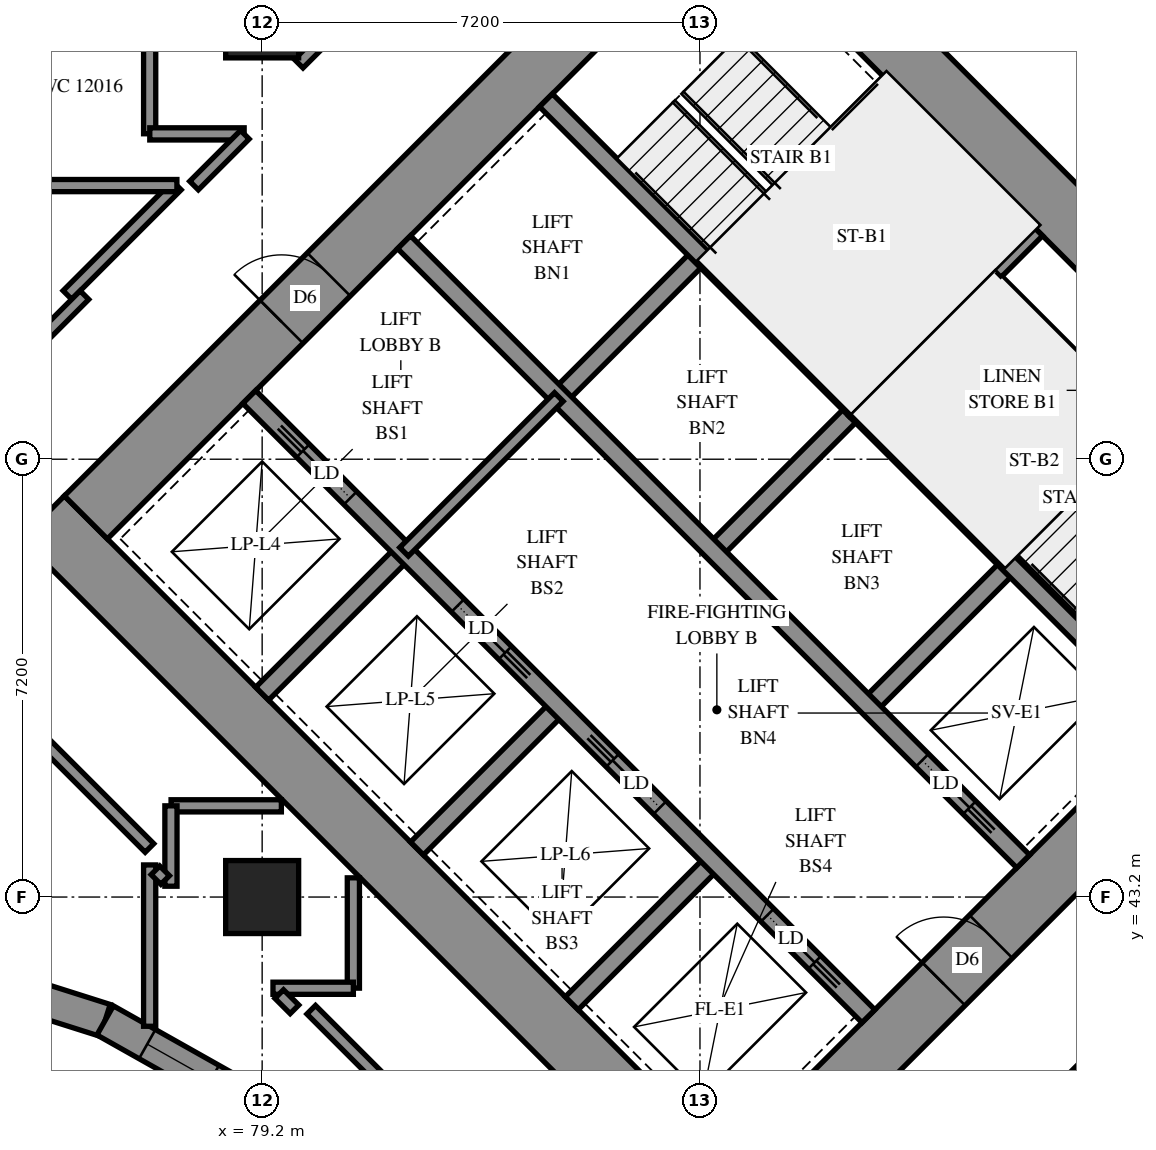
"""IFC4 building model, lengths in metres.
Left out: names, types, materials, properties, quantities, classifications, styles, units other than length and angle.
Written with IfcOpenShell. Run it as: python <this file> out.ifc"""

import sys

from ifc_helpers import new_model, si_unit, direction, frame, frame_2d, origin, origin_2d, place, context, subcontext, project, spatial, polyline, rectangle, outline, extrude, element, fill, save


model = new_model("IFC4")
c1 = context("Model", 3, precision=1e-05, world=origin(), true_north=direction((0.0, 1.0)))
c2 = subcontext(c1, "Body", "Model", "MODEL_VIEW")
j1 = project(units=[si_unit("LENGTHUNIT", "METRE"), si_unit("PLANEANGLEUNIT", "RADIAN")], contexts=[c1])
p1 = place(None, origin())
s1 = spatial("IfcSite", under=j1, at=p1, CompositionType="ELEMENT")
p2 = place(p1, origin())
s2 = spatial("IfcBuilding", under=s1, at=p2, CompositionType="ELEMENT")
p3 = place(p2, frame((0.0, 0.0, 47.4)))
s3 = spatial("IfcBuildingStorey", under=s2, at=p3, CompositionType="ELEMENT", Elevation=47.4)
for number, where, z_axis, x_axis in (
    (1, (79.2, 43.2, 0.0), (0.0, 0.0, 1.0), (1.0, 0.0, 0.0)),
    (2, (79.2, 57.6, 0.0), (0.0, 0.0, 1.0), (1.0, 0.0, 0.0)),
):
    element("IfcColumn", number, at=place(p3, frame(where, z_axis=z_axis, x_axis=x_axis)), inside=s3, PredefinedType="COLUMN", context=c2, shape_type="SweptSolid", body=[
        extrude(rectangle(XDim=1.2, YDim=1.2, at=origin_2d()), origin(), (0.0, 0.0, 1.0), 3.1),
    ])
p4 = place(p3, frame((75.594, 49.443, -0.3), z_axis=(0.0, 0.0, 1.0), x_axis=(0.7071037324, -0.70710983, 0.0)))
e3 = element("IfcWall", 3, at=p4, inside=s3, PredefinedType="SHEAR", context=c2, shape_type="SweptSolid", body=[
    extrude(rectangle(XDim=16.4, YDim=1.0, at=frame_2d((8.2, 0.0))), origin(), (0.0, 0.0, 1.0), 2.7),
])
p5 = place(p3, frame((86.483, 60.333, -0.3), z_axis=(0.0, 0.0, 1.0), x_axis=(0.70710983, -0.7071037324, 0.0)))
e4 = element("IfcWall", 4, at=p5, inside=s3, PredefinedType="SHEAR", context=c2, shape_type="SweptSolid", body=[
    extrude(rectangle(XDim=16.4, YDim=1.0, at=frame_2d((8.2, 0.0))), origin(), (0.0, 0.0, 1.0), 2.7),
])
p6 = place(p5, frame((11.0, 0.0, 0.3)))
e5 = element("IfcOpeningElement", 5, at=p6, cuts=e4, PredefinedType="OPENING", context=c2, shape_type="SweptSolid", body=[
    extrude(rectangle(XDim=0.8, YDim=2.1, at=frame_2d((0.4, 1.05))), frame((0.0, 0.51, 0.0), z_axis=(0.0, -1.0, 0.0), x_axis=(1.0, 0.0, 0.0)), (0.0, 0.0, 1.0), 1.02),
])
p7 = place(p3, frame((76.301, 49.443, -0.3), z_axis=(0.0, 0.0, 1.0), x_axis=(0.7071067812, 0.7071067812, 0.0)))
e6 = element("IfcWall", 6, at=p7, inside=s3, PredefinedType="SHEAR", context=c2, shape_type="SweptSolid", body=[
    extrude(rectangle(XDim=14.4, YDim=1.0, at=frame_2d((7.2, 0.0))), origin(), (0.0, 0.0, 1.0), 2.7),
])
p8 = place(p7, frame((4.55, 0.0, 0.3)))
e7 = element("IfcOpeningElement", 7, at=p8, cuts=e6, PredefinedType="OPENING", context=c2, shape_type="SweptSolid", body=[
    extrude(rectangle(XDim=1.1, YDim=2.1, at=frame_2d((0.55, 1.05))), frame((0.0, 0.51, 0.0), z_axis=(0.0, -1.0, 0.0), x_axis=(1.0, 0.0, 0.0)), (0.0, 0.0, 1.0), 1.02),
])
p9 = place(p7, frame((11.35, 0.0, 0.3)))
e8 = element("IfcOpeningElement", 8, at=p9, cuts=e6, PredefinedType="OPENING", context=c2, shape_type="SweptSolid", body=[
    extrude(rectangle(XDim=1.1, YDim=2.1, at=frame_2d((0.55, 1.05))), frame((0.0, 0.51, 0.0), z_axis=(0.0, -1.0, 0.0), x_axis=(1.0, 0.0, 0.0)), (0.0, 0.0, 1.0), 1.02),
])
p10 = place(p3, frame((87.19, 38.554, -0.3), z_axis=(0.0, 0.0, 1.0), x_axis=(0.707103309, 0.7071102534, 0.0)))
e9 = element("IfcWall", 9, at=p10, inside=s3, PredefinedType="SHEAR", context=c2, shape_type="SweptSolid", body=[
    extrude(rectangle(XDim=14.4, YDim=1.0, at=frame_2d((7.2, 0.0))), origin(), (0.0, 0.0, 1.0), 2.7),
])
p11 = place(p10, frame((4.55, 0.0, 0.3)))
e10 = element("IfcOpeningElement", 10, at=p11, cuts=e9, PredefinedType="OPENING", context=c2, shape_type="SweptSolid", body=[
    extrude(rectangle(XDim=1.1, YDim=2.1, at=frame_2d((0.55, 1.05))), frame((0.0, 0.51, 0.0), z_axis=(0.0, -1.0, 0.0), x_axis=(1.0, 0.0, 0.0)), (0.0, 0.0, 1.0), 1.02),
])
p12 = place(p10, frame((11.35, 0.0, 0.3)))
e11 = element("IfcOpeningElement", 11, at=p12, cuts=e9, PredefinedType="OPENING", context=c2, shape_type="SweptSolid", body=[
    extrude(rectangle(XDim=1.1, YDim=2.1, at=frame_2d((0.55, 1.05))), frame((0.0, 0.51, 0.0), z_axis=(0.0, -1.0, 0.0), x_axis=(1.0, 0.0, 0.0)), (0.0, 0.0, 1.0), 1.02),
])
for number, where, z_axis, x_axis in (
    (12, (79.2, 46.544, 0.0), (0.0, 0.0, 1.0), (0.707, 0.707, 0.0)),
    (13, (84.079, 51.423, 0.0), (0.0, 0.0, 1.0), (0.707, 0.707, 0.0)),
):
    element("IfcWall", number, at=place(p3, frame(where, z_axis=z_axis, x_axis=x_axis)), inside=s3, PredefinedType="SOLIDWALL", context=c2, shape_type="SweptSolid", body=[
        extrude(rectangle(XDim=3.3, YDim=0.3, at=frame_2d((1.65, 0.0))), origin(), (0.0, 0.0, 1.0), 3.1),
    ])
p13 = place(p3, frame((81.746, 43.999, 0.0), z_axis=(0.0, 0.0, 1.0), x_axis=(0.7071067812, 0.7071067812, 0.0)))
e14 = element("IfcWall", 14, at=p13, inside=s3, PredefinedType="SOLIDWALL", context=c2, shape_type="SweptSolid", body=[
    extrude(rectangle(XDim=3.3, YDim=0.3, at=frame_2d((1.65, 0.0))), origin(), (0.0, 0.0, 1.0), 3.1),
])
p14 = place(p3, frame((86.625, 48.878, 0.0), z_axis=(0.0, 0.0, 1.0), x_axis=(0.7071067812, 0.7071067812, 0.0)))
e15 = element("IfcWall", 15, at=p14, inside=s3, PredefinedType="SOLIDWALL", context=c2, shape_type="SweptSolid", body=[
    extrude(rectangle(XDim=3.3, YDim=0.3, at=frame_2d((1.65, 0.0))), origin(), (0.0, 0.0, 1.0), 3.1),
])
p15 = place(p3, frame((84.291, 41.453, 0.0), z_axis=(0.0, 0.0, 1.0), x_axis=(0.7071067812, 0.7071067812, 0.0)))
e16 = element("IfcWall", 16, at=p15, inside=s3, PredefinedType="SOLIDWALL", context=c2, shape_type="SweptSolid", body=[
    extrude(rectangle(XDim=3.3, YDim=0.3, at=frame_2d((1.65, 0.0))), origin(), (0.0, 0.0, 1.0), 3.1),
])
p16 = place(p3, frame((89.17, 46.332, 0.0), z_axis=(0.0, 0.0, 1.0), x_axis=(0.7071067812, 0.7071067812, 0.0)))
e17 = element("IfcWall", 17, at=p16, inside=s3, PredefinedType="SOLIDWALL", context=c2, shape_type="SweptSolid", body=[
    extrude(rectangle(XDim=3.3, YDim=0.3, at=frame_2d((1.65, 0.0))), origin(), (0.0, 0.0, 1.0), 3.1),
])
p17 = place(p3, frame((78.988, 51.423, 0.0), z_axis=(0.0, 0.0, 1.0), x_axis=(0.7071067812, -0.7071067812, 0.0)))
e18 = element("IfcWall", 18, at=p17, inside=s3, PredefinedType="SOLIDWALL", context=c2, shape_type="SweptSolid", body=[
    extrude(rectangle(XDim=14.4, YDim=0.3, at=frame_2d((7.2, 0.0))), origin(), (0.0, 0.0, 1.0), 3.1),
])
p18 = place(p17, frame((1.25, 0.0, 0.0)))
e19 = element("IfcOpeningElement", 19, at=p18, cuts=e18, PredefinedType="OPENING", context=c2, shape_type="SweptSolid", body=[
    extrude(rectangle(XDim=1.1, YDim=2.1, at=frame_2d((0.55, 1.05))), frame((0.0, 0.16, 0.0), z_axis=(0.0, -1.0, 0.0), x_axis=(1.0, 0.0, 0.0)), (0.0, 0.0, 1.0), 0.32),
])
p19 = place(p17, frame((4.85, 0.0, 0.0)))
e20 = element("IfcOpeningElement", 20, at=p19, cuts=e18, PredefinedType="OPENING", context=c2, shape_type="SweptSolid", body=[
    extrude(rectangle(XDim=1.1, YDim=2.1, at=frame_2d((0.55, 1.05))), frame((0.0, 0.16, 0.0), z_axis=(0.0, -1.0, 0.0), x_axis=(1.0, 0.0, 0.0)), (0.0, 0.0, 1.0), 0.32),
])
p20 = place(p17, frame((8.45, 0.0, 0.0)))
e21 = element("IfcOpeningElement", 21, at=p20, cuts=e18, PredefinedType="OPENING", context=c2, shape_type="SweptSolid", body=[
    extrude(rectangle(XDim=1.1, YDim=2.1, at=frame_2d((0.55, 1.05))), frame((0.0, 0.16, 0.0), z_axis=(0.0, -1.0, 0.0), x_axis=(1.0, 0.0, 0.0)), (0.0, 0.0, 1.0), 0.32),
])
p21 = place(p17, frame((12.05, 0.0, 0.0)))
e22 = element("IfcOpeningElement", 22, at=p21, cuts=e18, PredefinedType="OPENING", context=c2, shape_type="SweptSolid", body=[
    extrude(rectangle(XDim=1.1, YDim=2.1, at=frame_2d((0.55, 1.05))), frame((0.0, 0.16, 0.0), z_axis=(0.0, -1.0, 0.0), x_axis=(1.0, 0.0, 0.0)), (0.0, 0.0, 1.0), 0.32),
])
p22 = place(p3, frame((81.534, 53.969, 0.0), z_axis=(0.0, 0.0, 1.0), x_axis=(0.707103309, -0.7071102534, 0.0)))
e23 = element("IfcWall", 23, at=p22, inside=s3, PredefinedType="SOLIDWALL", context=c2, shape_type="SweptSolid", body=[
    extrude(rectangle(XDim=14.4, YDim=0.3, at=frame_2d((7.2, 0.0))), origin(), (0.0, 0.0, 1.0), 3.1),
])
p23 = place(p22, frame((12.05, 0.0, 0.0)))
e24 = element("IfcOpeningElement", 24, at=p23, cuts=e23, PredefinedType="OPENING", context=c2, shape_type="SweptSolid", body=[
    extrude(rectangle(XDim=1.1, YDim=2.1, at=frame_2d((0.55, 1.05))), frame((0.0, 0.16, 0.0), z_axis=(0.0, -1.0, 0.0), x_axis=(1.0, 0.0, 0.0)), (0.0, 0.0, 1.0), 0.32),
])
for number, where, z_axis, x_axis in (
    (25, (83.867, 56.302, 0.0), (0.0, 0.0, 1.0), (0.707, -0.707, 0.0)),
    (26, (88.958, 51.211, 0.0), (0.0, 0.0, 1.0), (0.707, -0.707, 0.0)),
):
    element("IfcWall", number, at=place(p3, frame(where, z_axis=z_axis, x_axis=x_axis)), inside=s3, PredefinedType="SOLIDWALL", context=c2, shape_type="SweptSolid", body=[
        extrude(rectangle(XDim=7.2, YDim=0.3, at=frame_2d((3.6, 0.0))), origin(), (0.0, 0.0, 1.0), 3.1),
    ])
p24 = place(p3, frame((88.958, 51.211, 0.0), z_axis=(0.0, 0.0, 1.0), x_axis=(0.7071067812, 0.7071067812, 0.0)))
e27 = element("IfcWall", 27, at=p24, inside=s3, PredefinedType="SOLIDWALL", context=c2, shape_type="SweptSolid", body=[
    extrude(rectangle(XDim=4.2, YDim=0.3, at=frame_2d((2.1, 0.0))), origin(), (0.0, 0.0, 1.0), 3.1),
])
p25 = place(p3, frame((73.118, 42.281, 0.0), z_axis=(0.0, 0.0, 1.0), x_axis=(0.953263549, -0.3021400438, 0.0)))
e28 = element("IfcWall", 28, at=p25, inside=s3, PredefinedType="SOLIDWALL", context=c2, shape_type="SweptSolid", body=[
    extrude(outline(polyline([(0.062, -0.275), (3.643, -0.275), (3.7, 0.275), (-0.062, 0.275), (0.062, -0.275)])), origin(), (0.0, 0.0, 1.0), 3.1),
])
p26 = place(p25, frame((0.802, 0.0, 0.5)))
e29 = element("IfcOpeningElement", 29, at=p26, cuts=e28, PredefinedType="OPENING", context=c2, shape_type="SweptSolid", body=[
    extrude(rectangle(XDim=1.2, YDim=2.45, at=frame_2d((0.6, 1.225))), frame((0.0, 0.285, 0.0), z_axis=(0.0, -1.0, 0.0), x_axis=(1.0, 0.0, 0.0)), (0.0, 0.0, 1.0), 0.57),
])
p27 = place(p3, frame((76.618, 41.172, 0.0), z_axis=(0.0, 0.0, 1.0), x_axis=(0.8713014776, -0.4907481381, 0.0)))
e30 = element("IfcWall", 30, at=p27, inside=s3, PredefinedType="SOLIDWALL", context=c2, shape_type="SweptSolid", body=[
    extrude(outline(polyline([(0.028, -0.275), (4.049, -0.275), (4.16, 0.275), (-0.028, 0.275), (0.028, -0.275)])), origin(), (0.0, 0.0, 1.0), 3.1),
])
p28 = place(p27, frame((0.795, 0.0, 0.5)))
e31 = element("IfcOpeningElement", 31, at=p28, cuts=e30, PredefinedType="OPENING", context=c2, shape_type="SweptSolid", body=[
    extrude(rectangle(XDim=1.2, YDim=2.45, at=frame_2d((0.6, 1.225))), frame((0.0, 0.285, 0.0), z_axis=(0.0, -1.0, 0.0), x_axis=(1.0, 0.0, 0.0)), (0.0, 0.0, 1.0), 0.57),
])
p29 = place(p27, frame((2.197, 0.0, 0.5)))
e32 = element("IfcOpeningElement", 32, at=p29, cuts=e30, PredefinedType="OPENING", context=c2, shape_type="SweptSolid", body=[
    extrude(rectangle(XDim=1.2, YDim=2.45, at=frame_2d((0.6, 1.225))), frame((0.0, 0.285, 0.0), z_axis=(0.0, -1.0, 0.0), x_axis=(1.0, 0.0, 0.0)), (0.0, 0.0, 1.0), 0.57),
])
p30 = place(p3, frame((91.313, 53.354, 0.0), z_axis=(0.0, 0.0, 1.0), x_axis=(0.7071147811, -0.7070987812, 0.0)))
e33 = element("IfcWall", 33, at=p30, inside=s3, PredefinedType="PARTITIONING", context=c2, shape_type="SweptSolid", body=[
    extrude(rectangle(XDim=6.25, YDim=0.15, at=frame_2d((3.125, 0.0))), origin(), (0.0, 0.0, 1.0), 3.1),
])
p31 = place(p3, frame((81.534, 48.878, 0.0), z_axis=(0.0, 0.0, 1.0), x_axis=(0.707092892, 0.7071206701, 0.0)))
e34 = element("IfcWall", 34, at=p31, inside=s3, PredefinedType="PARTITIONING", context=c2, shape_type="SweptSolid", body=[
    extrude(rectangle(XDim=3.6, YDim=0.2, at=frame_2d((1.8, 0.0))), origin(), (0.0, 0.0, 1.0), 3.1),
])
p32 = place(p3, frame((86.317, 33.298, 0.0), z_axis=(0.0, 0.0, 1.0), x_axis=(0.7071020793, 0.7071114831, 0.0)))
e35 = element("IfcWall", 35, at=p32, inside=s3, PredefinedType="PARTITIONING", context=c2, shape_type="SweptSolid", body=[
    extrude(rectangle(XDim=10.634, YDim=0.2, at=frame_2d((5.317, 0.0))), origin(), (0.0, 0.0, 1.0), 3.1),
])
p33 = place(p3, frame((86.836, 34.524, 0.0), z_axis=(0.0, 0.0, 1.0), x_axis=(0.7071067812, 0.7071067812, 0.0)))
e36 = element("IfcWall", 36, at=p33, inside=s3, PredefinedType="PARTITIONING", context=c2, shape_type="SweptSolid", body=[
    extrude(rectangle(XDim=9.399, YDim=0.2, at=frame_2d((4.699, 0.0))), origin(), (0.0, 0.0, 1.0), 3.1),
])
p34 = place(p3, frame((89.271, 61.215, 0.0), z_axis=(0.0, 0.0, 1.0), x_axis=(0.7071067812, -0.7071067812, 0.0)))
e37 = element("IfcWall", 37, at=p34, inside=s3, PredefinedType="PARTITIONING", context=c2, shape_type="SweptSolid", body=[
    extrude(rectangle(XDim=6.505, YDim=0.2, at=frame_2d((3.253, 0.0))), origin(), (0.0, 0.0, 1.0), 3.1),
])
p35 = place(p3, frame((80.007, 41.347, 0.0), z_axis=(0.0, 0.0, 1.0), x_axis=(0.7071067812, -0.7071067812, 0.0)))
e38 = element("IfcWall", 38, at=p35, inside=s3, PredefinedType="PARTITIONING", context=c2, shape_type="SweptSolid", body=[
    extrude(rectangle(XDim=6.206, YDim=0.2, at=frame_2d((3.103, 0.0))), origin(), (0.0, 0.0, 1.0), 3.1),
])
p36 = place(p3, frame((74.057, 47.297, 0.0), z_axis=(0.0, 0.0, 1.0), x_axis=(0.7071067812, -0.7071067812, 0.0)))
e39 = element("IfcWall", 39, at=p36, inside=s3, PredefinedType="PARTITIONING", context=c2, shape_type="SweptSolid", body=[
    extrude(rectangle(XDim=4.653, YDim=0.2, at=frame_2d((2.326, 0.0))), origin(), (0.0, 0.0, 1.0), 3.1),
])
p37 = place(p36, frame((0.57, 0.0, 0.0)))
e40 = element("IfcOpeningElement", 40, at=p37, cuts=e39, PredefinedType="OPENING", context=c2, shape_type="SweptSolid", body=[
    extrude(rectangle(XDim=1.0, YDim=2.1, at=frame_2d((0.5, 1.05))), frame((0.0, 0.11, 0.0), z_axis=(0.0, -1.0, 0.0), x_axis=(1.0, 0.0, 0.0)), (0.0, 0.0, 1.0), 0.22),
])
p38 = place(p3, frame((77.35, 41.075, 0.0), z_axis=(0.0, 0.0, 1.0), x_axis=(0.0, 1.0, 0.0)))
e41 = element("IfcWall", 41, at=p38, inside=s3, PredefinedType="PARTITIONING", context=c2, shape_type="SweptSolid", body=[
    extrude(rectangle(XDim=2.653, YDim=0.2, at=frame_2d((1.327, 0.0))), origin(), (0.0, 0.0, 1.0), 3.1),
])
p39 = place(p3, frame((75.997, 53.101, 0.0), z_axis=(0.0, 0.0, 1.0), x_axis=(0.7071067812, 0.7071067812, 0.0)))
e42 = element("IfcWall", 42, at=p39, inside=s3, PredefinedType="PARTITIONING", context=c2, shape_type="SweptSolid", body=[
    extrude(rectangle(XDim=2.546, YDim=0.2, at=frame_2d((1.273, 0.0))), origin(), (0.0, 0.0, 1.0), 3.1),
])
p40 = place(p3, frame((75.3, 54.9, 0.0), z_axis=(0.0, 0.0, 1.0), x_axis=(1.0, 0.0, 0.0)))
e43 = element("IfcWall", 43, at=p40, inside=s3, PredefinedType="PARTITIONING", context=c2, shape_type="SweptSolid", body=[
    extrude(rectangle(XDim=2.498, YDim=0.2, at=frame_2d((1.249, 0.0))), origin(), (0.0, 0.0, 1.0), 3.1),
])
for number, where, z_axis, x_axis in (
    (44, (77.702, 44.7, 0.0), (0.0, 0.0, 1.0), (1.0, 0.0, 0.0)),
    (45, (80.7, 41.702, 0.0), (0.0, 0.0, 1.0), (0.0, 1.0, 0.0)),
):
    element("IfcWall", number, at=place(p3, frame(where, z_axis=z_axis, x_axis=x_axis)), inside=s3, PredefinedType="PARTITIONING", context=c2, shape_type="SweptSolid", body=[
        extrude(rectangle(XDim=1.814, YDim=0.2, at=frame_2d((0.907, 0.0))), origin(), (0.0, 0.0, 1.0), 3.1),
    ])
p41 = place(p3, frame((79.801, 56.905, 0.0), z_axis=(0.0, 0.0, 1.0), x_axis=(0.7071067812, 0.7071067812, 0.0)))
e46 = element("IfcWall", 46, at=p41, inside=s3, PredefinedType="PARTITIONING", context=c2, shape_type="SweptSolid", body=[
    extrude(rectangle(XDim=1.765, YDim=0.2, at=frame_2d((0.882, 0.0))), origin(), (0.0, 0.0, 1.0), 3.1),
])
p42 = place(p3, frame((75.102, 51.922, 0.0), z_axis=(0.0, 0.0, 1.0), x_axis=(0.7071067812, 0.7071067812, 0.0)))
e47 = element("IfcWall", 47, at=p42, inside=s3, PredefinedType="PARTITIONING", context=c2, shape_type="SweptSolid", body=[
    extrude(rectangle(XDim=1.663, YDim=0.2, at=frame_2d((0.832, 0.0))), origin(), (0.0, 0.0, 1.0), 3.1),
])
for number, where, z_axis, x_axis in (
    (48, (77.35, 55.752, 0.0), (0.0, 0.0, 1.0), (0.0, 1.0, 0.0)),
    (49, (77.352, 55.75, 0.0), (0.0, 0.0, 1.0), (1.0, 0.0, 0.0)),
):
    element("IfcWall", number, at=place(p3, frame(where, z_axis=z_axis, x_axis=x_axis)), inside=s3, PredefinedType="PARTITIONING", context=c2, shape_type="SweptSolid", body=[
        extrude(rectangle(XDim=1.552, YDim=0.2, at=frame_2d((0.776, 0.0))), origin(), (0.0, 0.0, 1.0), 3.1),
    ])
for number, where, z_axis, x_axis in (
    (50, (77.7, 43.378, 0.0), (0.0, 0.0, 1.0), (0.0, 1.0, 0.0)),
    (51, (79.378, 41.7, 0.0), (0.0, 0.0, 1.0), (1.0, 0.0, 0.0)),
):
    element("IfcWall", number, at=place(p3, frame(where, z_axis=z_axis, x_axis=x_axis)), inside=s3, PredefinedType="PARTITIONING", context=c2, shape_type="SweptSolid", body=[
        extrude(rectangle(XDim=1.322, YDim=0.2, at=frame_2d((0.661, 0.0))), origin(), (0.0, 0.0, 1.0), 3.1),
    ])
p43 = place(p3, frame((78.079, 54.901, 0.0), z_axis=(0.0, 0.0, 1.0), x_axis=(0.7071067812, 0.7071067812, 0.0)))
e52 = element("IfcWall", 52, at=p43, inside=s3, PredefinedType="PARTITIONING", context=c2, shape_type="SweptSolid", body=[
    extrude(rectangle(XDim=1.182, YDim=0.2, at=frame_2d((0.591, 0.0))), origin(), (0.0, 0.0, 1.0), 3.1),
])
p44 = place(p3, frame((77.445, 43.64, 0.0), z_axis=(0.0, 0.0, 1.0), x_axis=(0.7071067812, -0.7071067812, 0.0)))
e53 = element("IfcWall", 53, at=p44, inside=s3, PredefinedType="PARTITIONING", context=c2, shape_type="SweptSolid", body=[
    extrude(rectangle(XDim=0.225, YDim=0.2, at=frame_2d((0.113, 0.0))), origin(), (0.0, 0.0, 1.0), 3.1),
])
p45 = place(p3, frame((79.481, 41.605, 0.0), z_axis=(0.0, 0.0, 1.0), x_axis=(0.7071067812, -0.7071067812, 0.0)))
e54 = element("IfcWall", 54, at=p45, inside=s3, PredefinedType="PARTITIONING", context=c2, shape_type="SweptSolid", body=[
    extrude(rectangle(XDim=0.355, YDim=0.2, at=frame_2d((0.177, 0.0))), origin(), (0.0, 0.0, 1.0), 3.1),
])
p46 = place(p28, origin())
e55 = element("IfcWindow", 55, at=p46, inside=s3, PartitioningType="SINGLE_PANEL", PredefinedType="WINDOW", context=c2, shape_type="SweptSolid", body=[
    extrude(rectangle(XDim=1.2, YDim=2.45, at=frame_2d((0.6, 1.225))), frame((0.0, 0.155, 0.0), z_axis=(0.0, -1.0, 0.0), x_axis=(1.0, 0.0, 0.0)), (0.0, 0.0, 1.0), 0.06),
])
fill(e31, e55)
p47 = place(p8, origin())
e56 = element("IfcDoor", 56, at=p47, inside=s3, OperationType="DOUBLE_DOOR_SINGLE_SWING", PredefinedType="DOOR", context=c2, shape_type="SweptSolid", body=[
    extrude(rectangle(XDim=1.1, YDim=2.1, at=frame_2d((0.55, 1.05))), frame((0.0, 0.025, 0.0), z_axis=(0.0, -1.0, 0.0), x_axis=(1.0, 0.0, 0.0)), (0.0, 0.0, 1.0), 0.05),
])
fill(e7, e56)
p48 = place(p11, origin())
e57 = element("IfcDoor", 57, at=p48, inside=s3, OperationType="DOUBLE_DOOR_SINGLE_SWING", PredefinedType="DOOR", context=c2, shape_type="SweptSolid", body=[
    extrude(rectangle(XDim=1.1, YDim=2.1, at=frame_2d((0.55, 1.05))), frame((0.0, 0.025, 0.0), z_axis=(0.0, -1.0, 0.0), x_axis=(1.0, 0.0, 0.0)), (0.0, 0.0, 1.0), 0.05),
])
fill(e10, e57)
p49 = place(p18, origin())
e58 = element("IfcDoor", 58, at=p49, inside=s3, OperationType="SLIDING_TO_LEFT", PredefinedType="DOOR", context=c2, shape_type="SweptSolid", body=[
    extrude(rectangle(XDim=1.1, YDim=2.1, at=frame_2d((0.55, 1.05))), frame((0.0, 0.025, 0.0), z_axis=(0.0, -1.0, 0.0), x_axis=(1.0, 0.0, 0.0)), (0.0, 0.0, 1.0), 0.05),
])
fill(e19, e58)
p50 = place(p19, origin())
e59 = element("IfcDoor", 59, at=p50, inside=s3, OperationType="SLIDING_TO_RIGHT", PredefinedType="DOOR", context=c2, shape_type="SweptSolid", body=[
    extrude(rectangle(XDim=1.1, YDim=2.1, at=frame_2d((0.55, 1.05))), frame((0.0, 0.025, 0.0), z_axis=(0.0, -1.0, 0.0), x_axis=(1.0, 0.0, 0.0)), (0.0, 0.0, 1.0), 0.05),
])
fill(e20, e59)
p51 = place(p20, origin())
e60 = element("IfcDoor", 60, at=p51, inside=s3, OperationType="SLIDING_TO_LEFT", PredefinedType="DOOR", context=c2, shape_type="SweptSolid", body=[
    extrude(rectangle(XDim=1.1, YDim=2.1, at=frame_2d((0.55, 1.05))), frame((0.0, 0.025, 0.0), z_axis=(0.0, -1.0, 0.0), x_axis=(1.0, 0.0, 0.0)), (0.0, 0.0, 1.0), 0.05),
])
fill(e21, e60)
p52 = place(p21, origin())
e61 = element("IfcDoor", 61, at=p52, inside=s3, OperationType="SLIDING_TO_RIGHT", PredefinedType="DOOR", context=c2, shape_type="SweptSolid", body=[
    extrude(rectangle(XDim=1.1, YDim=2.1, at=frame_2d((0.55, 1.05))), frame((0.0, 0.025, 0.0), z_axis=(0.0, -1.0, 0.0), x_axis=(1.0, 0.0, 0.0)), (0.0, 0.0, 1.0), 0.05),
])
fill(e22, e61)
p53 = place(p23, origin())
e62 = element("IfcDoor", 62, at=p53, inside=s3, OperationType="SLIDING_TO_RIGHT", PredefinedType="DOOR", context=c2, shape_type="SweptSolid", body=[
    extrude(rectangle(XDim=1.1, YDim=2.1, at=frame_2d((0.55, 1.05))), frame((0.0, 0.025, 0.0), z_axis=(0.0, -1.0, 0.0), x_axis=(1.0, 0.0, 0.0)), (0.0, 0.0, 1.0), 0.05),
])
fill(e24, e62)
save(model, sys.argv[1])
